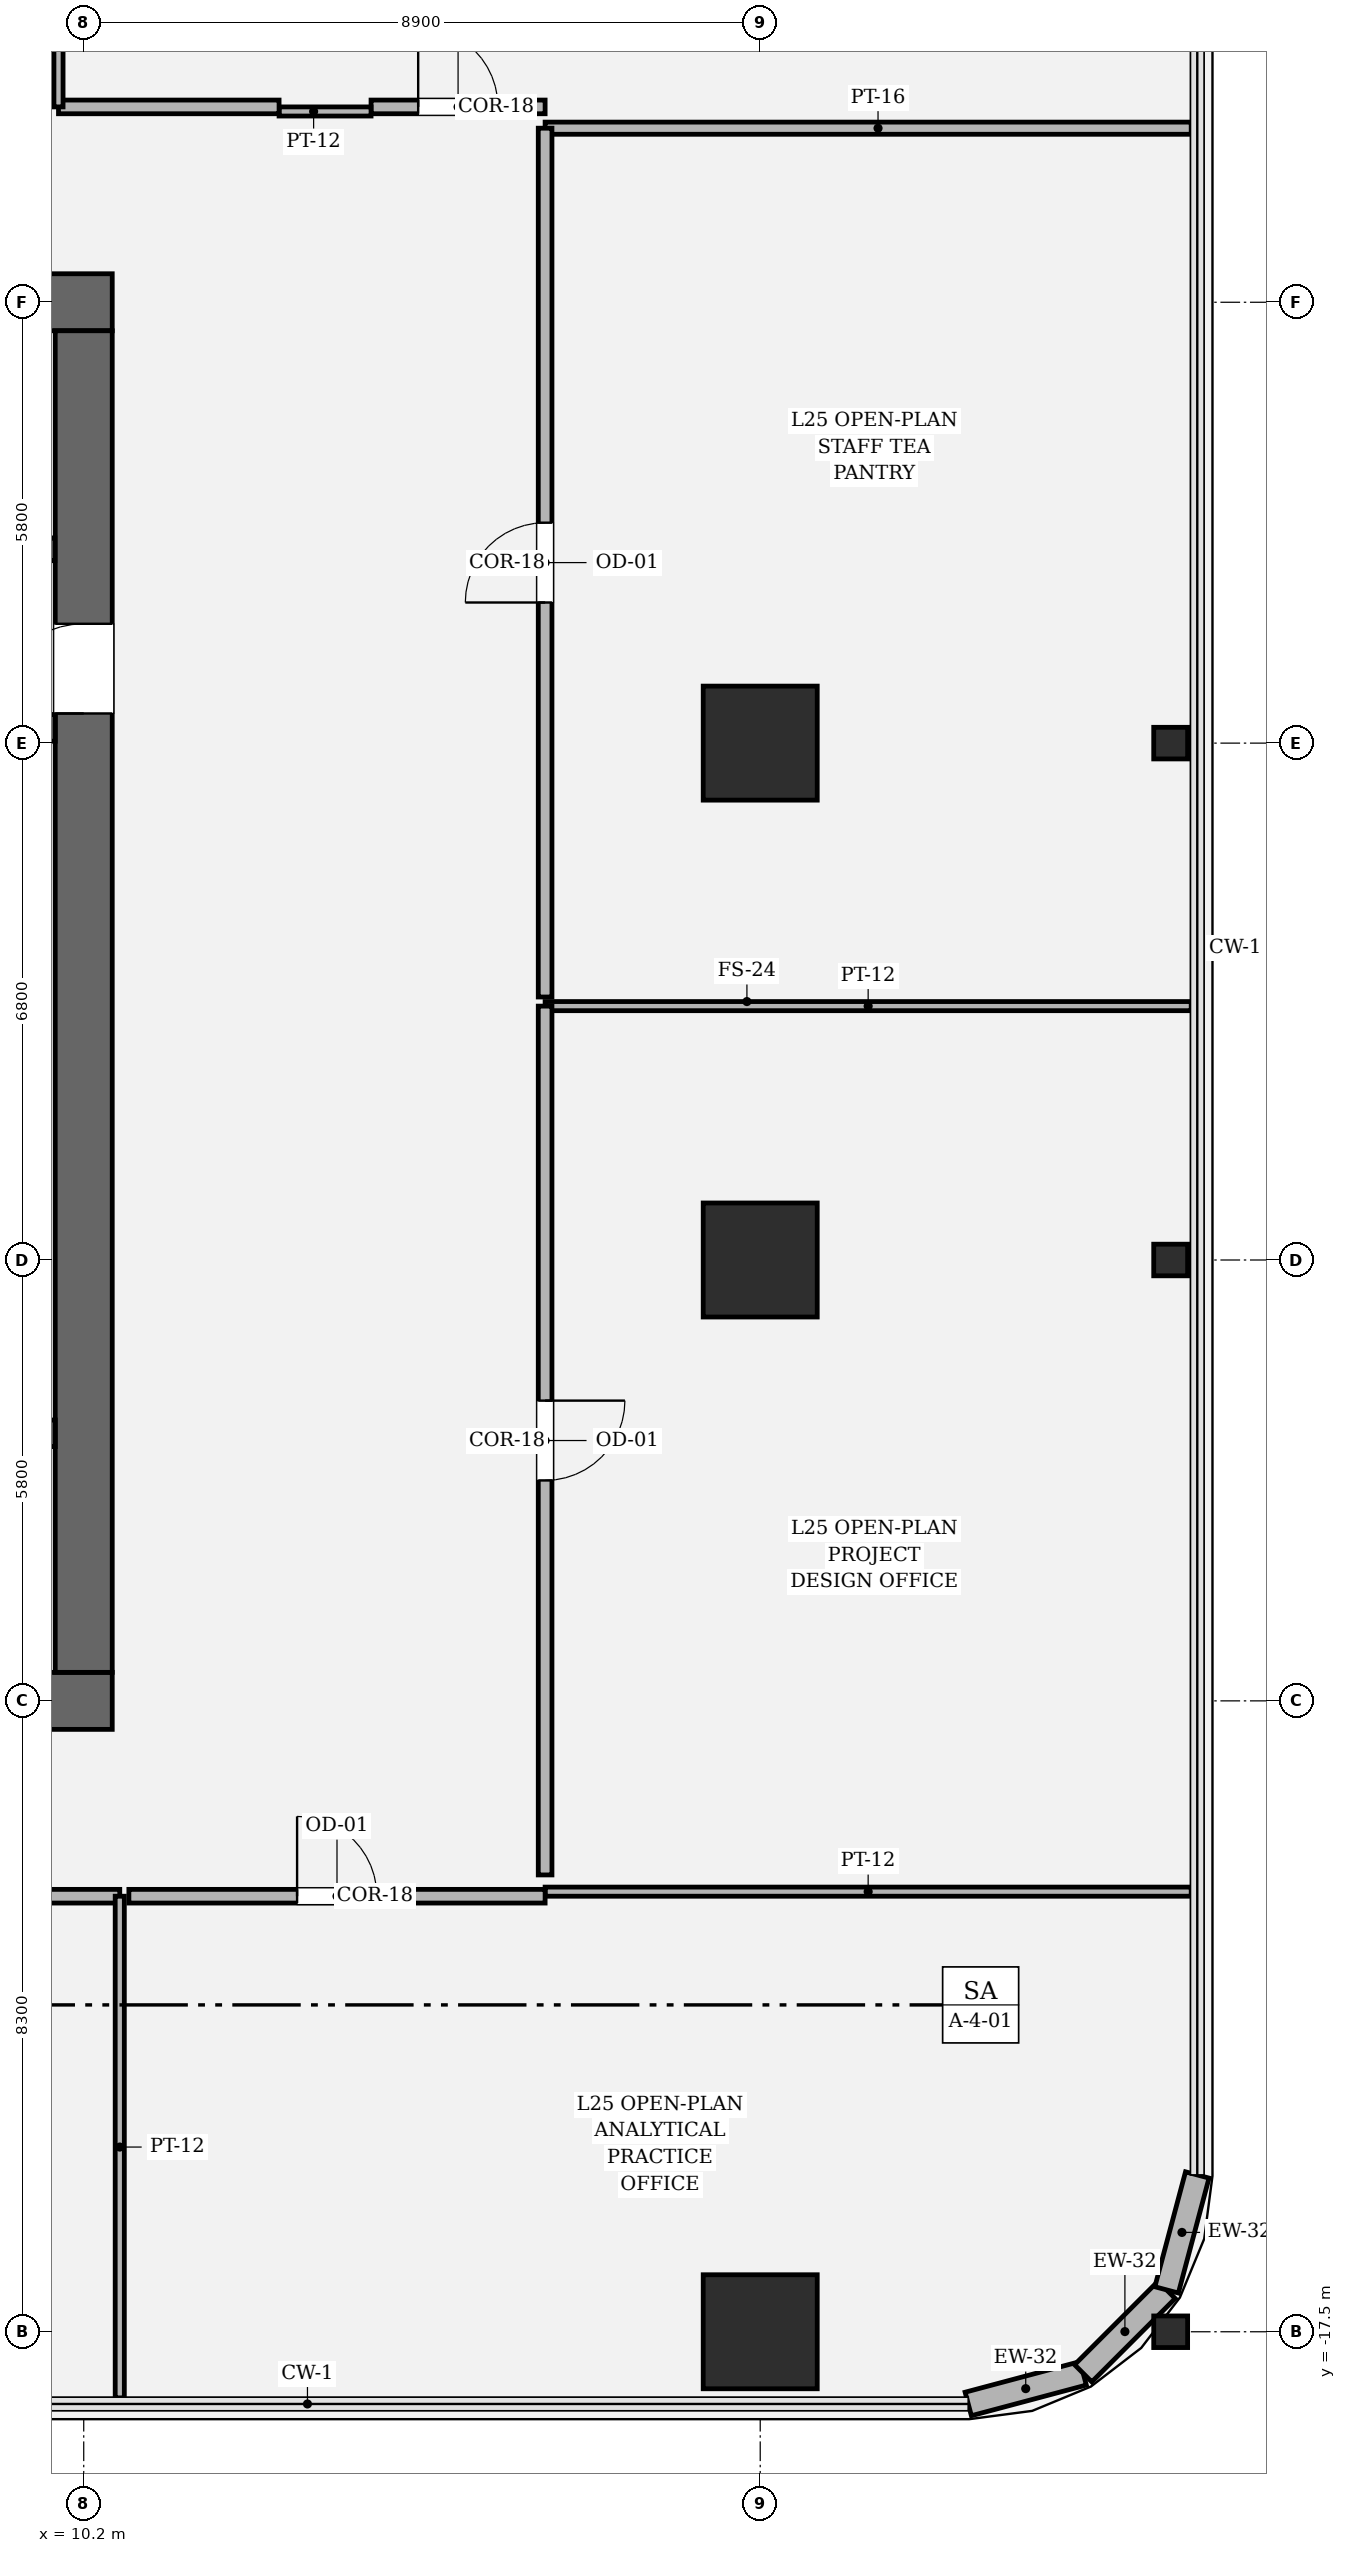
"""IFC4 building model, lengths in metres.
Left out: names, types, materials, properties, quantities, classifications, styles, units other than length and angle.
Written with IfcOpenShell. Run it as: python <this file> out.ifc"""

import sys

from ifc_helpers import new_model, si_unit, direction, frame, frame_2d, origin, origin_2d, place, context, subcontext, project, spatial, rectangle, hollow_rectangle, i_section, extrude, element, fill, save


model = new_model("IFC4")
c1 = context("Model", 3, precision=1e-05, world=origin(), true_north=direction((0.0, 1.0)))
c2 = subcontext(c1, "Body", "Model", "MODEL_VIEW")
j1 = project(units=[si_unit("LENGTHUNIT", "METRE"), si_unit("PLANEANGLEUNIT", "RADIAN")], contexts=[c1])
p1 = place(None, origin())
s1 = spatial("IfcSite", under=j1, at=p1, CompositionType="ELEMENT")
p2 = place(p1, origin())
s2 = spatial("IfcBuilding", under=s1, at=p2, CompositionType="ELEMENT")
p3 = place(p2, frame((0.0, 0.0, 109.2)))
s3 = spatial("IfcBuildingStorey", under=s2, at=p3, CompositionType="ELEMENT", Elevation=109.2)
p4 = place(p3, frame((10.575, -9.2, 0.0), z_axis=(0.0, 0.0, 1.0), x_axis=(-1.0, 0.0, 0.0)))
e1 = element("IfcWall", 1, at=p4, inside=s3, PredefinedType="SHEAR", context=c2, shape_type="SweptSolid", body=[
    extrude(rectangle(XDim=21.15, YDim=0.75, at=frame_2d((10.575, 0.0))), origin(), (0.0, 0.0, 1.0), 4.05),
])
p5 = place(p4, frame((2.85, 0.0, 0.0)))
e2 = element("IfcOpeningElement", 2, at=p5, cuts=e1, PredefinedType="OPENING", context=c2, shape_type="SweptSolid", body=[
    extrude(rectangle(XDim=1.25, YDim=2.25, at=frame_2d((0.625, 1.125))), frame((0.0, 0.385, 0.0), z_axis=(0.0, -1.0, 0.0), x_axis=(1.0, 0.0, 0.0)), (0.0, 0.0, 1.0), 0.77),
])
p6 = place(p4, frame((17.05, 0.0, 0.0)))
e3 = element("IfcOpeningElement", 3, at=p6, cuts=e1, PredefinedType="OPENING", context=c2, shape_type="SweptSolid", body=[
    extrude(rectangle(XDim=1.25, YDim=2.25, at=frame_2d((0.625, 1.125))), frame((0.0, 0.385, 0.0), z_axis=(0.0, -1.0, 0.0), x_axis=(1.0, 0.0, 0.0)), (0.0, 0.0, 1.0), 0.77),
])
p7 = place(p3, frame((-10.575, 9.2, 0.0), z_axis=(0.0, 0.0, 1.0), x_axis=(1.0, 0.0, 0.0)))
e4 = element("IfcWall", 4, at=p7, inside=s3, PredefinedType="SHEAR", context=c2, shape_type="SweptSolid", body=[
    extrude(rectangle(XDim=21.15, YDim=0.75, at=frame_2d((10.575, 0.0))), origin(), (0.0, 0.0, 1.0), 4.05),
])
p8 = place(p3, frame((10.2, 8.825, 0.0), z_axis=(0.0, 0.0, 1.0), x_axis=(0.0, -1.0, 0.0)))
e5 = element("IfcWall", 5, at=p8, inside=s3, PredefinedType="SHEAR", context=c2, shape_type="SweptSolid", body=[
    extrude(rectangle(XDim=17.65, YDim=0.75, at=frame_2d((8.825, 0.0))), origin(), (0.0, 0.0, 1.0), 4.05),
])
p9 = place(p8, frame((3.855, 0.0, 0.0)))
e6 = element("IfcOpeningElement", 6, at=p9, cuts=e5, PredefinedType="OPENING", context=c2, shape_type="SweptSolid", body=[
    extrude(rectangle(XDim=1.18, YDim=2.2, at=frame_2d((0.59, 1.1))), frame((0.0, 0.385, 0.0), z_axis=(0.0, -1.0, 0.0), x_axis=(1.0, 0.0, 0.0)), (0.0, 0.0, 1.0), 0.77),
])
p10 = place(p3, frame((4.65, -5.68, 0.0), z_axis=(0.0, 0.0, 1.0), x_axis=(1.0, 0.0, 0.0)))
e7 = element("IfcWall", 7, at=p10, inside=s3, PredefinedType="SOLIDWALL", context=c2, shape_type="SweptSolid", body=[
    extrude(rectangle(XDim=5.175, YDim=0.35, at=frame_2d((2.587, 0.0))), origin(), (0.0, 0.0, 1.0), 4.05),
])
p11 = place(p10, frame((2.71, 0.0, 0.0)))
e8 = element("IfcOpeningElement", 8, at=p11, cuts=e7, PredefinedType="OPENING", context=c2, shape_type="SweptSolid", body=[
    extrude(rectangle(XDim=1.18, YDim=2.2, at=frame_2d((0.59, 1.1))), frame((0.0, 0.185, 0.0), z_axis=(0.0, -1.0, 0.0), x_axis=(1.0, 0.0, 0.0)), (0.0, 0.0, 1.0), 0.37),
])
p12 = place(p3, frame((4.65, 3.6, 0.0), z_axis=(0.0, 0.0, 1.0), x_axis=(1.0, 0.0, 0.0)))
e9 = element("IfcWall", 9, at=p12, inside=s3, PredefinedType="SOLIDWALL", context=c2, shape_type="SweptSolid", body=[
    extrude(rectangle(XDim=5.175, YDim=0.35, at=frame_2d((2.587, 0.0))), origin(), (0.0, 0.0, 1.0), 4.05),
])
for number, where, z_axis, x_axis in (
    (10, (19.1, -17.5, 0.0), (0.0, 0.0, 1.0), (1.0, 0.0, 0.0)),
    (11, (19.1, -3.4, 0.0), (0.0, 0.0, 1.0), (1.0, 0.0, 0.0)),
    (12, (19.1, 3.4, 0.0), (0.0, 0.0, 1.0), (1.0, 0.0, 0.0)),
):
    element("IfcColumn", number, at=place(p3, frame(where, z_axis=z_axis, x_axis=x_axis)), inside=s3, PredefinedType="COLUMN", context=c2, shape_type="SweptSolid", body=[
        extrude(hollow_rectangle(XDim=1.5, YDim=1.5, WallThickness=0.045, at=origin_2d()), origin(), (0.0, 0.0, 1.0), 4.05),
    ])
for number, where, z_axis, x_axis in (
    (13, (24.5, -17.5, 0.0), (0.0, 0.0, 1.0), (0.0, 1.0, 0.0)),
    (14, (24.5, -3.4, 0.0), (0.0, 0.0, 1.0), (0.0, 1.0, 0.0)),
    (15, (24.5, 3.4, 0.0), (0.0, 0.0, 1.0), (0.0, 1.0, 0.0)),
):
    element("IfcColumn", number, at=place(p3, frame(where, z_axis=z_axis, x_axis=x_axis)), inside=s3, PredefinedType="COLUMN", context=c2, shape_type="SweptSolid", body=[
        extrude(i_section(OverallWidth=0.416, OverallDepth=0.446, WebThickness=0.039, FlangeThickness=0.062, FilletRadius=0.018, at=origin_2d()), origin(), (0.0, 0.0, 1.0), 4.048),
    ])
p13 = place(p3, frame((21.837, -18.45, 0.0), z_axis=(0.0, 0.0, 1.0), x_axis=(0.966224582397, 0.257701486942, 0.0)))
e16 = element("IfcWall", 16, at=p13, inside=s3, PredefinedType="SOLIDWALL", context=c2, shape_type="SweptSolid", body=[
    extrude(rectangle(XDim=1.565, YDim=0.32, at=frame_2d((0.783, 0.0))), origin(), (0.0, 0.0, 1.0), 3.81),
])
p14 = place(p3, frame((23.349, -18.047, 0.0), z_axis=(0.0, 0.0, 1.0), x_axis=(0.707106781187, 0.707106781187, 0.0)))
e17 = element("IfcWall", 17, at=p14, inside=s3, PredefinedType="SOLIDWALL", context=c2, shape_type="SweptSolid", body=[
    extrude(rectangle(XDim=1.552, YDim=0.32, at=frame_2d((0.776, 0.0))), origin(), (0.0, 0.0, 1.0), 2.484),
])
p15 = place(p3, frame((24.447, -16.949, 0.0), z_axis=(0.0, 0.0, 1.0), x_axis=(0.257847112249, 0.966185730957, 0.0)))
e18 = element("IfcWall", 18, at=p15, inside=s3, PredefinedType="SOLIDWALL", context=c2, shape_type="SweptSolid", body=[
    extrude(rectangle(XDim=1.565, YDim=0.32, at=frame_2d((0.783, 0.0))), origin(), (0.0, 0.0, 1.0), 2.524),
])
p16 = place(p3, frame((5.06, 5.95, 0.0), z_axis=(0.0, 0.0, 1.0), x_axis=(1.0, 0.0, 0.0)))
e19 = element("IfcWall", 19, at=p16, inside=s3, PredefinedType="SOLIDWALL", context=c2, shape_type="SweptSolid", body=[
    extrude(rectangle(XDim=4.76, YDim=0.3, at=frame_2d((2.38, 0.0))), origin(), (0.0, 0.0, 1.0), 3.81),
])
p17 = place(p3, frame((-12.77, -11.77, 0.0), z_axis=(0.0, 0.0, 1.0), x_axis=(1.0, 0.0, 0.0)))
e20 = element("IfcWall", 20, at=p17, inside=s3, PredefinedType="PARTITIONING", context=c2, shape_type="SweptSolid", body=[
    extrude(rectangle(XDim=23.444, YDim=0.18, at=frame_2d((11.722, 0.0))), origin(), (0.0, 0.0, 1.0), 3.104),
])
p18 = place(p17, frame((11.197, 0.0, 0.0)))
e21 = element("IfcOpeningElement", 21, at=p18, cuts=e20, PredefinedType="OPENING", context=c2, shape_type="SweptSolid", body=[
    extrude(rectangle(XDim=1.05, YDim=2.2, at=frame_2d((0.525, 1.1))), frame((0.0, 0.1, 0.0), z_axis=(0.0, -1.0, 0.0), x_axis=(1.0, 0.0, 0.0)), (0.0, 0.0, 1.0), 0.2),
])
p19 = place(p3, frame((10.674, -11.77, 0.0), z_axis=(0.0, 0.0, 1.0), x_axis=(0.0, -1.0, 0.0)))
e22 = element("IfcWall", 22, at=p19, inside=s3, PredefinedType="PARTITIONING", context=c2, shape_type="SweptSolid", body=[
    extrude(rectangle(XDim=6.6, YDim=0.12, at=frame_2d((3.3, 0.0))), origin(), (0.0, 0.0, 1.0), 3.104),
])
p20 = place(p3, frame((16.27, -11.71, 0.0), z_axis=(0.0, 0.0, 1.0), x_axis=(1.0, 0.0, 0.0)))
e23 = element("IfcWall", 23, at=p20, inside=s3, PredefinedType="PARTITIONING", context=c2, shape_type="SweptSolid", body=[
    extrude(rectangle(XDim=8.5, YDim=0.12, at=frame_2d((4.25, 0.0))), origin(), (0.0, 0.0, 1.0), 2.524),
])
p21 = place(p3, frame((10.794, -11.77, 0.0), z_axis=(0.0, 0.0, 1.0), x_axis=(1.0, 0.0, 0.0)))
e24 = element("IfcWall", 24, at=p21, inside=s3, PredefinedType="PARTITIONING", context=c2, shape_type="SweptSolid", body=[
    extrude(rectangle(XDim=5.476, YDim=0.18, at=frame_2d((2.738, 0.0))), origin(), (0.0, 0.0, 1.0), 3.354),
])
p22 = place(p21, frame((2.213, 0.0, 0.0)))
e25 = element("IfcOpeningElement", 25, at=p22, cuts=e24, PredefinedType="OPENING", context=c2, shape_type="SweptSolid", body=[
    extrude(rectangle(XDim=1.05, YDim=2.2, at=frame_2d((0.525, 1.1))), frame((0.0, 0.1, 0.0), z_axis=(0.0, -1.0, 0.0), x_axis=(1.0, 0.0, 0.0)), (0.0, 0.0, 1.0), 0.2),
])
p23 = place(p3, frame((16.27, -0.06, 0.0), z_axis=(0.0, 0.0, 1.0), x_axis=(1.0, 0.0, 0.0)))
e26 = element("IfcWall", 26, at=p23, inside=s3, PredefinedType="PARTITIONING", context=c2, shape_type="SweptSolid", body=[
    extrude(rectangle(XDim=8.5, YDim=0.12, at=frame_2d((4.25, 0.0))), origin(), (0.0, 0.0, 1.0), 2.524),
])
p24 = place(p3, frame((16.27, -11.49, 0.0), z_axis=(0.0, 0.0, 1.0), x_axis=(0.0, 1.0, 0.0)))
e27 = element("IfcWall", 27, at=p24, inside=s3, PredefinedType="PARTITIONING", context=c2, shape_type="SweptSolid", body=[
    extrude(rectangle(XDim=11.43, YDim=0.18, at=frame_2d((5.715, 0.0))), origin(), (0.0, 0.0, 1.0), 3.104),
])
p25 = place(p24, frame((5.19, 0.0, 0.0)))
e28 = element("IfcOpeningElement", 28, at=p25, cuts=e27, PredefinedType="OPENING", context=c2, shape_type="SweptSolid", body=[
    extrude(rectangle(XDim=1.05, YDim=2.2, at=frame_2d((0.525, 1.1))), frame((0.0, 0.1, 0.0), z_axis=(0.0, -1.0, 0.0), x_axis=(1.0, 0.0, 0.0)), (0.0, 0.0, 1.0), 0.2),
])
p26 = place(p3, frame((16.27, 11.49, 0.0), z_axis=(0.0, 0.0, 1.0), x_axis=(1.0, 0.0, 0.0)))
e29 = element("IfcWall", 29, at=p26, inside=s3, PredefinedType="PARTITIONING", context=c2, shape_type="SweptSolid", body=[
    extrude(rectangle(XDim=8.5, YDim=0.16, at=frame_2d((4.25, 0.0))), origin(), (0.0, 0.0, 1.0), 3.104),
])
p27 = place(p3, frame((16.27, 0.06, 0.0), z_axis=(0.0, 0.0, 1.0), x_axis=(0.0, 1.0, 0.0)))
e30 = element("IfcWall", 30, at=p27, inside=s3, PredefinedType="PARTITIONING", context=c2, shape_type="SweptSolid", body=[
    extrude(rectangle(XDim=11.43, YDim=0.18, at=frame_2d((5.715, 0.0))), origin(), (0.0, 0.0, 1.0), 3.104),
])
p28 = place(p27, frame((5.19, 0.0, 0.0)))
e31 = element("IfcOpeningElement", 31, at=p28, cuts=e30, PredefinedType="OPENING", context=c2, shape_type="SweptSolid", body=[
    extrude(rectangle(XDim=1.05, YDim=2.2, at=frame_2d((0.525, 1.1))), frame((0.0, 0.1, 0.0), z_axis=(0.0, -1.0, 0.0), x_axis=(1.0, 0.0, 0.0)), (0.0, 0.0, 1.0), 0.2),
])
p29 = place(p3, frame((16.27, 11.77, 0.0), z_axis=(0.0, 0.0, 1.0), x_axis=(-1.0, 0.0, 0.0)))
e32 = element("IfcWall", 32, at=p29, inside=s3, PredefinedType="PARTITIONING", context=c2, shape_type="SweptSolid", body=[
    extrude(rectangle(XDim=2.29, YDim=0.18, at=frame_2d((1.145, 0.0))), origin(), (0.0, 0.0, 1.0), 3.354),
])
p30 = place(p29, frame((0.62, 0.0, 0.0)))
e33 = element("IfcOpeningElement", 33, at=p30, cuts=e32, PredefinedType="OPENING", context=c2, shape_type="SweptSolid", body=[
    extrude(rectangle(XDim=1.05, YDim=2.2, at=frame_2d((0.525, 1.1))), frame((0.0, 0.1, 0.0), z_axis=(0.0, -1.0, 0.0), x_axis=(1.0, 0.0, 0.0)), (0.0, 0.0, 1.0), 0.2),
])
p31 = place(p3, frame((13.98, 11.71, 0.0), z_axis=(0.0, 0.0, 1.0), x_axis=(-1.0, 0.0, 0.0)))
e34 = element("IfcWall", 34, at=p31, inside=s3, PredefinedType="PARTITIONING", context=c2, shape_type="SweptSolid", body=[
    extrude(rectangle(XDim=1.21, YDim=0.12, at=frame_2d((0.605, 0.0))), origin(), (0.0, 0.0, 1.0), 3.81),
])
p32 = place(p3, frame((12.77, 11.77, 0.0), z_axis=(0.0, 0.0, 1.0), x_axis=(-1.0, 0.0, 0.0)))
e35 = element("IfcWall", 35, at=p32, inside=s3, PredefinedType="PARTITIONING", context=c2, shape_type="SweptSolid", body=[
    extrude(rectangle(XDim=2.902, YDim=0.18, at=frame_2d((1.451, 0.0))), origin(), (0.0, 0.0, 1.0), 3.104),
])
p33 = place(p3, frame((9.868, 11.77, 0.0), z_axis=(0.0, 0.0, 1.0), x_axis=(0.0, 1.0, 0.0)))
e36 = element("IfcWall", 36, at=p33, inside=s3, PredefinedType="PARTITIONING", context=c2, shape_type="SweptSolid", body=[
    extrude(rectangle(XDim=11.4, YDim=0.12, at=frame_2d((5.7, 0.0))), origin(), (0.0, 0.0, 1.0), 3.104),
])
p34 = place(p9, origin())
e37 = element("IfcDoor", 37, at=p34, inside=s3, OperationType="SINGLE_SWING_RIGHT", PredefinedType="DOOR", context=c2, shape_type="SweptSolid", body=[
    extrude(rectangle(XDim=1.18, YDim=2.2, at=frame_2d((0.59, 1.1))), frame((0.0, 0.025, 0.0), z_axis=(0.0, -1.0, 0.0), x_axis=(1.0, 0.0, 0.0)), (0.0, 0.0, 1.0), 0.05),
])
fill(e6, e37)
p35 = place(p22, origin())
e38 = element("IfcDoor", 38, at=p35, inside=s3, OperationType="SINGLE_SWING_LEFT", PredefinedType="DOOR", context=c2, shape_type="SweptSolid", body=[
    extrude(rectangle(XDim=1.05, YDim=2.2, at=frame_2d((0.525, 1.1))), frame((0.0, 0.025, 0.0), z_axis=(0.0, -1.0, 0.0), x_axis=(1.0, 0.0, 0.0)), (0.0, 0.0, 1.0), 0.05),
])
fill(e25, e38)
p36 = place(p25, origin())
e39 = element("IfcDoor", 39, at=p36, inside=s3, OperationType="SINGLE_SWING_RIGHT", PredefinedType="DOOR", context=c2, shape_type="SweptSolid", body=[
    extrude(rectangle(XDim=1.05, YDim=2.2, at=frame_2d((0.525, 1.1))), frame((0.0, 0.025, 0.0), z_axis=(0.0, -1.0, 0.0), x_axis=(1.0, 0.0, 0.0)), (0.0, 0.0, 1.0), 0.05),
])
fill(e28, e39)
p37 = place(p28, origin())
e40 = element("IfcDoor", 40, at=p37, inside=s3, OperationType="SINGLE_SWING_LEFT", PredefinedType="DOOR", context=c2, shape_type="SweptSolid", body=[
    extrude(rectangle(XDim=1.05, YDim=2.2, at=frame_2d((0.525, 1.1))), frame((0.0, 0.025, 0.0), z_axis=(0.0, -1.0, 0.0), x_axis=(1.0, 0.0, 0.0)), (0.0, 0.0, 1.0), 0.05),
])
fill(e31, e40)
p38 = place(p30, origin())
e41 = element("IfcDoor", 41, at=p38, inside=s3, OperationType="SINGLE_SWING_RIGHT", PredefinedType="DOOR", context=c2, shape_type="SweptSolid", body=[
    extrude(rectangle(XDim=1.05, YDim=2.2, at=frame_2d((0.525, 1.1))), frame((0.0, 0.025, 0.0), z_axis=(0.0, -1.0, 0.0), x_axis=(1.0, 0.0, 0.0)), (0.0, 0.0, 1.0), 0.05),
])
fill(e33, e41)
save(model, sys.argv[1])
